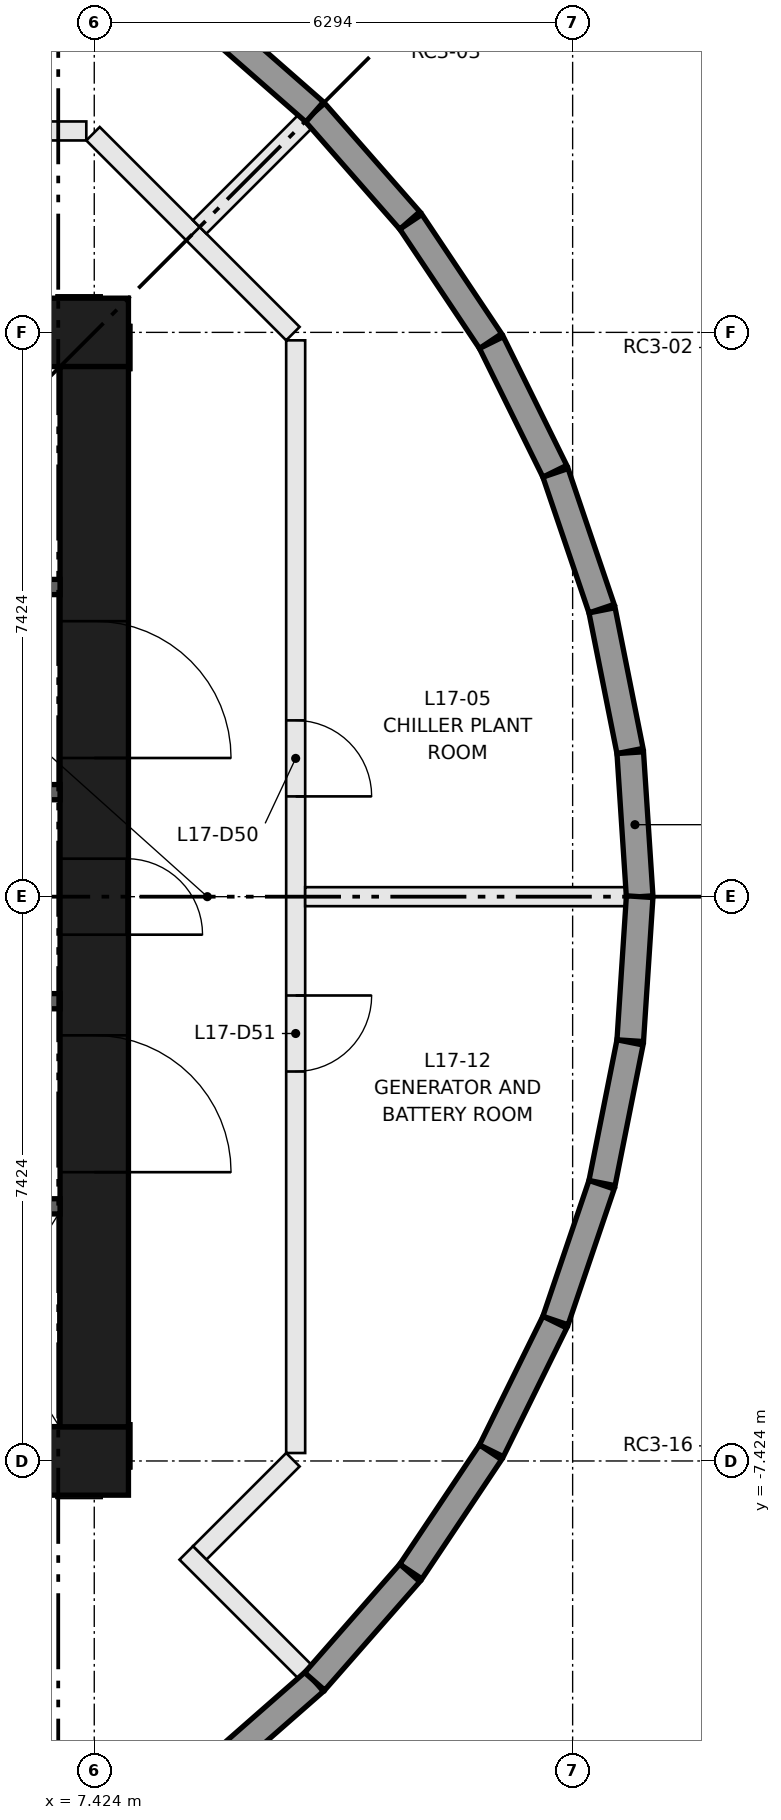
"""IFC4 building model, lengths in metres.
Left out: names, types, materials, properties, quantities, classifications, styles, units other than length and angle.
Written with IfcOpenShell. Run it as: python <this file> out.ifc"""

import sys

from ifc_helpers import new_model, si_unit, direction, frame, frame_2d, origin, place, context, subcontext, project, spatial, rectangle, extrude, element, fill, save


model = new_model("IFC4")
c1 = context("Model", 3, precision=1e-05, world=origin(), true_north=direction((0.0, 1.0)))
c2 = subcontext(c1, "Body", "Model", "MODEL_VIEW")
j1 = project(units=[si_unit("LENGTHUNIT", "METRE"), si_unit("PLANEANGLEUNIT", "RADIAN")], contexts=[c1])
p1 = place(None, origin())
s1 = spatial("IfcSite", under=j1, at=p1, CompositionType="ELEMENT")
p2 = place(p1, origin())
s2 = spatial("IfcBuilding", under=s1, at=p2, CompositionType="ELEMENT")
p3 = place(p2, frame((0.0, 0.0, 66.35)))
s3 = spatial("IfcBuildingStorey", under=s2, at=p3, CompositionType="ELEMENT", Elevation=66.35)
for number, where, z_axis, x_axis in (
    (1, (-7.874, -7.424, 0.0), (0.0, 0.0, 1.0), (1.0, 0.0, 0.0)),
    (2, (-7.874, 7.424, 0.0), (0.0, 0.0, 1.0), (1.0, 0.0, 0.0)),
):
    element("IfcWall", number, at=place(p3, frame(where, z_axis=z_axis, x_axis=x_axis)), inside=s3, PredefinedType="SHEAR", context=c2, shape_type="SweptSolid", body=[
        extrude(rectangle(XDim=15.748, YDim=0.9, at=frame_2d((7.874, 0.0))), origin(), (0.0, 0.0, 1.0), 6.4),
    ])
p4 = place(p3, frame((7.424, -6.974, 0.0), z_axis=(0.0, 0.0, 1.0), x_axis=(0.0, 1.0, 0.0)))
e3 = element("IfcWall", 3, at=p4, inside=s3, PredefinedType="SHEAR", context=c2, shape_type="SweptSolid", body=[
    extrude(rectangle(XDim=13.948, YDim=0.9, at=frame_2d((6.974, 0.0))), origin(), (0.0, 0.0, 1.0), 6.4),
])
p5 = place(p4, frame((6.474, 0.0, 0.0)))
e4 = element("IfcOpeningElement", 4, at=p5, cuts=e3, PredefinedType="OPENING", context=c2, shape_type="SweptSolid", body=[
    extrude(rectangle(XDim=1.0, YDim=2.1, at=frame_2d((0.5, 1.05))), frame((0.0, 0.46, 0.0), z_axis=(0.0, -1.0, 0.0), x_axis=(1.0, 0.0, 0.0)), (0.0, 0.0, 1.0), 0.92),
])
p6 = place(p4, frame((3.35, 0.0, 0.0)))
e5 = element("IfcOpeningElement", 5, at=p6, cuts=e3, PredefinedType="OPENING", context=c2, shape_type="SweptSolid", body=[
    extrude(rectangle(XDim=1.8, YDim=2.1, at=frame_2d((0.9, 1.05))), frame((0.0, 0.46, 0.0), z_axis=(0.0, -1.0, 0.0), x_axis=(1.0, 0.0, 0.0)), (0.0, 0.0, 1.0), 0.92),
])
p7 = place(p4, frame((8.799, 0.0, 0.0)))
e6 = element("IfcOpeningElement", 6, at=p7, cuts=e3, PredefinedType="OPENING", context=c2, shape_type="SweptSolid", body=[
    extrude(rectangle(XDim=1.8, YDim=2.1, at=frame_2d((0.9, 1.05))), frame((0.0, 0.46, 0.0), z_axis=(0.0, -1.0, 0.0), x_axis=(1.0, 0.0, 0.0)), (0.0, 0.0, 1.0), 0.92),
])
p8 = place(p3, frame((-6.974, -4.074, 0.0), z_axis=(0.0, 0.0, 1.0), x_axis=(1.0, 0.0, 0.0)))
e7 = element("IfcWall", 7, at=p8, inside=s3, PredefinedType="SHEAR", context=c2, shape_type="SweptSolid", body=[
    extrude(rectangle(XDim=13.948, YDim=0.2, at=frame_2d((6.974, 0.0))), origin(), (0.0, 0.0, 1.0), 6.05),
])
p9 = place(p8, frame((0.918, 0.0, 0.0)))
e8 = element("IfcOpeningElement", 8, at=p9, cuts=e7, PredefinedType="OPENING", context=c2, shape_type="SweptSolid", body=[
    extrude(rectangle(XDim=1.1, YDim=2.1, at=frame_2d((0.55, 1.05))), frame((0.0, 0.11, 0.0), z_axis=(0.0, -1.0, 0.0), x_axis=(1.0, 0.0, 0.0)), (0.0, 0.0, 1.0), 0.22),
])
p10 = place(p8, frame((4.055, 0.0, 0.0)))
e9 = element("IfcOpeningElement", 9, at=p10, cuts=e7, PredefinedType="OPENING", context=c2, shape_type="SweptSolid", body=[
    extrude(rectangle(XDim=1.1, YDim=2.1, at=frame_2d((0.55, 1.05))), frame((0.0, 0.11, 0.0), z_axis=(0.0, -1.0, 0.0), x_axis=(1.0, 0.0, 0.0)), (0.0, 0.0, 1.0), 0.22),
])
p11 = place(p8, frame((6.658, 0.0, 0.0)))
e10 = element("IfcOpeningElement", 10, at=p11, cuts=e7, PredefinedType="OPENING", context=c2, shape_type="SweptSolid", body=[
    extrude(rectangle(XDim=1.0, YDim=2.1, at=frame_2d((0.5, 1.05))), frame((0.0, 0.11, 0.0), z_axis=(0.0, -1.0, 0.0), x_axis=(1.0, 0.0, 0.0)), (0.0, 0.0, 1.0), 0.22),
])
p12 = place(p8, frame((8.627, 0.0, 0.0)))
e11 = element("IfcOpeningElement", 11, at=p12, cuts=e7, PredefinedType="OPENING", context=c2, shape_type="SweptSolid", body=[
    extrude(rectangle(XDim=1.0, YDim=2.1, at=frame_2d((0.5, 1.05))), frame((0.0, 0.11, 0.0), z_axis=(0.0, -1.0, 0.0), x_axis=(1.0, 0.0, 0.0)), (0.0, 0.0, 1.0), 0.22),
])
p13 = place(p8, frame((10.595, 0.0, 0.0)))
e12 = element("IfcOpeningElement", 12, at=p13, cuts=e7, PredefinedType="OPENING", context=c2, shape_type="SweptSolid", body=[
    extrude(rectangle(XDim=1.0, YDim=2.1, at=frame_2d((0.5, 1.05))), frame((0.0, 0.11, 0.0), z_axis=(0.0, -1.0, 0.0), x_axis=(1.0, 0.0, 0.0)), (0.0, 0.0, 1.0), 0.22),
])
p14 = place(p8, frame((12.564, 0.0, 0.0)))
e13 = element("IfcOpeningElement", 13, at=p14, cuts=e7, PredefinedType="OPENING", context=c2, shape_type="SweptSolid", body=[
    extrude(rectangle(XDim=1.0, YDim=2.1, at=frame_2d((0.5, 1.05))), frame((0.0, 0.11, 0.0), z_axis=(0.0, -1.0, 0.0), x_axis=(1.0, 0.0, 0.0)), (0.0, 0.0, 1.0), 0.22),
])
p15 = place(p3, frame((0.0, 4.074, 0.0), z_axis=(0.0, 0.0, 1.0), x_axis=(1.0, 0.0, 0.0)))
e14 = element("IfcWall", 14, at=p15, inside=s3, PredefinedType="SHEAR", context=c2, shape_type="SweptSolid", body=[
    extrude(rectangle(XDim=6.974, YDim=0.2, at=frame_2d((3.487, 0.0))), origin(), (0.0, 0.0, 1.0), 6.05),
])
p16 = place(p15, frame((1.187, 0.0, 0.0)))
e15 = element("IfcOpeningElement", 15, at=p16, cuts=e14, PredefinedType="OPENING", context=c2, shape_type="SweptSolid", body=[
    extrude(rectangle(XDim=1.0, YDim=2.1, at=frame_2d((0.5, 1.05))), frame((0.0, 0.11, 0.0), z_axis=(0.0, -1.0, 0.0), x_axis=(1.0, 0.0, 0.0)), (0.0, 0.0, 1.0), 0.22),
])
p17 = place(p15, frame((3.94, 0.0, 0.0)))
e16 = element("IfcOpeningElement", 16, at=p17, cuts=e14, PredefinedType="OPENING", context=c2, shape_type="SweptSolid", body=[
    extrude(rectangle(XDim=0.8, YDim=2.1, at=frame_2d((0.4, 1.05))), frame((0.0, 0.11, 0.0), z_axis=(0.0, -1.0, 0.0), x_axis=(1.0, 0.0, 0.0)), (0.0, 0.0, 1.0), 0.22),
])
p18 = place(p15, frame((5.79, 0.0, 0.0)))
e17 = element("IfcOpeningElement", 17, at=p18, cuts=e14, PredefinedType="OPENING", context=c2, shape_type="SweptSolid", body=[
    extrude(rectangle(XDim=0.8, YDim=2.1, at=frame_2d((0.4, 1.05))), frame((0.0, 0.11, 0.0), z_axis=(0.0, -1.0, 0.0), x_axis=(1.0, 0.0, 0.0)), (0.0, 0.0, 1.0), 0.22),
])
for number, where, z_axis, x_axis in (
    (18, (4.374, -1.375, 0.0), (0.0, 0.0, 1.0), (1.0, 0.0, 0.0)),
    (19, (4.374, 1.375, 0.0), (0.0, 0.0, 1.0), (1.0, 0.0, 0.0)),
):
    element("IfcWall", number, at=place(p3, frame(where, z_axis=z_axis, x_axis=x_axis)), inside=s3, PredefinedType="SHEAR", context=c2, shape_type="SweptSolid", body=[
        extrude(rectangle(XDim=2.6, YDim=0.2, at=frame_2d((1.3, 0.0))), origin(), (0.0, 0.0, 1.0), 6.05),
    ])
p19 = place(p3, frame((8.722, 8.722, 0.0), z_axis=(0.0, 0.0, 1.0), x_axis=(0.707172427269, -0.707041129009, 0.0)))
e20 = element("IfcWall", 20, at=p19, inside=s3, PredefinedType="PARTITIONING", context=c2, shape_type="SweptSolid", body=[
    extrude(rectangle(XDim=1.859, YDim=0.25, at=frame_2d((0.93, 0.0))), origin(), (0.0, 0.0, 1.0), 6.05),
])
p20 = place(p3, frame((10.074, 7.319, 0.0), z_axis=(0.0, 0.0, 1.0), x_axis=(0.0, -1.0, 0.0)))
e21 = element("IfcWall", 21, at=p20, inside=s3, PredefinedType="PARTITIONING", context=c2, shape_type="SweptSolid", body=[
    extrude(rectangle(XDim=7.319, YDim=0.25, at=frame_2d((3.66, 0.0))), origin(), (0.0, 0.0, 1.0), 6.05),
])
p21 = place(p20, frame((5.0, 0.0, 0.0)))
e22 = element("IfcOpeningElement", 22, at=p21, cuts=e21, PredefinedType="OPENING", context=c2, shape_type="SweptSolid", body=[
    extrude(rectangle(XDim=1.0, YDim=2.1, at=frame_2d((0.5, 1.05))), frame((0.0, 0.135, 0.0), z_axis=(0.0, -1.0, 0.0), x_axis=(1.0, 0.0, 0.0)), (0.0, 0.0, 1.0), 0.27),
])
p22 = place(p3, frame((10.037, -7.408, 0.0), z_axis=(0.0, 0.0, 1.0), x_axis=(-0.707177157576, -0.707036397792, 0.0)))
e23 = element("IfcWall", 23, at=p22, inside=s3, PredefinedType="PARTITIONING", context=c2, shape_type="SweptSolid", body=[
    extrude(rectangle(XDim=1.734, YDim=0.25, at=frame_2d((0.867, 0.0))), origin(), (0.0, 0.0, 1.0), 6.05),
])
p23 = place(p3, frame((10.074, 0.0, 0.0), z_axis=(0.0, 0.0, 1.0), x_axis=(0.0, -1.0, 0.0)))
e24 = element("IfcWall", 24, at=p23, inside=s3, PredefinedType="PARTITIONING", context=c2, shape_type="SweptSolid", body=[
    extrude(rectangle(XDim=7.319, YDim=0.25, at=frame_2d((3.66, 0.0))), origin(), (0.0, 0.0, 1.0), 6.05),
])
p24 = place(p23, frame((1.3, 0.0, 0.0)))
e25 = element("IfcOpeningElement", 25, at=p24, cuts=e24, PredefinedType="OPENING", context=c2, shape_type="SweptSolid", body=[
    extrude(rectangle(XDim=1.0, YDim=2.1, at=frame_2d((0.5, 1.05))), frame((0.0, 0.135, 0.0), z_axis=(0.0, -1.0, 0.0), x_axis=(1.0, 0.0, 0.0)), (0.0, 0.0, 1.0), 0.27),
])
p25 = place(p3, frame((0.125, 10.074, 0.0), z_axis=(0.0, 0.0, 1.0), x_axis=(1.0, 0.0, 0.0)))
e26 = element("IfcWall", 26, at=p25, inside=s3, PredefinedType="PARTITIONING", context=c2, shape_type="SweptSolid", body=[
    extrude(rectangle(XDim=7.194, YDim=0.25, at=frame_2d((3.597, 0.0))), origin(), (0.0, 0.0, 1.0), 6.05),
])
p26 = place(p25, frame((1.2, 0.0, 0.0)))
e27 = element("IfcOpeningElement", 27, at=p26, cuts=e26, PredefinedType="OPENING", context=c2, shape_type="SweptSolid", body=[
    extrude(rectangle(XDim=1.0, YDim=2.1, at=frame_2d((0.5, 1.05))), frame((0.0, 0.135, 0.0), z_axis=(0.0, -1.0, 0.0), x_axis=(1.0, 0.0, 0.0)), (0.0, 0.0, 1.0), 0.27),
])
p27 = place(p3, frame((7.408, 10.037, 0.0), z_axis=(0.0, 0.0, 1.0), x_axis=(0.707041129009, -0.707172427269, 0.0)))
e28 = element("IfcWall", 28, at=p27, inside=s3, PredefinedType="PARTITIONING", context=c2, shape_type="SweptSolid", body=[
    extrude(rectangle(XDim=1.859, YDim=0.25, at=frame_2d((0.93, 0.0))), origin(), (0.0, 0.0, 1.0), 6.05),
])
p28 = place(p3, frame((10.324, 10.324, 0.0), z_axis=(0.0, 0.0, 1.0), x_axis=(0.659360034108, -0.751827337506, 0.0)))
e29 = element("IfcWall", 29, at=p28, inside=s3, PredefinedType="PARTITIONING", context=c2, shape_type="SweptSolid", body=[
    extrude(rectangle(XDim=1.898, YDim=0.35, at=frame_2d((0.949, 0.0))), origin(), (0.0, 0.0, 1.0), 6.05),
])
p29 = place(p3, frame((11.589, 8.878, 0.0), z_axis=(0.0, 0.0, 1.0), x_axis=(0.555595643605, -0.831452632931, 0.0)))
e30 = element("IfcWall", 30, at=p29, inside=s3, PredefinedType="PARTITIONING", context=c2, shape_type="SweptSolid", body=[
    extrude(rectangle(XDim=1.887, YDim=0.35, at=frame_2d((0.943, 0.0))), origin(), (0.0, 0.0, 1.0), 6.05),
])
for number, where, z_axis, x_axis in (
    (31, (12.649, 7.29, 0.0), (0.0, 0.0, 1.0), (0.442, -0.897, 0.0)),
    (32, (13.492, 5.576, 0.0), (0.0, 0.0, 1.0), (0.322, -0.947, 0.0)),
):
    element("IfcWall", number, at=place(p3, frame(where, z_axis=z_axis, x_axis=x_axis)), inside=s3, PredefinedType="PARTITIONING", context=c2, shape_type="SweptSolid", body=[
        extrude(rectangle(XDim=1.887, YDim=0.35, at=frame_2d((0.943, 0.0))), origin(), (0.0, 0.0, 1.0), 6.05),
    ])
p30 = place(p3, frame((14.105, 3.768, 0.0), z_axis=(0.0, 0.0, 1.0), x_axis=(0.195120723342, -0.980779232714, 0.0)))
e33 = element("IfcWall", 33, at=p30, inside=s3, PredefinedType="PARTITIONING", context=c2, shape_type="SweptSolid", body=[
    extrude(rectangle(XDim=1.887, YDim=0.35, at=frame_2d((0.943, 0.0))), origin(), (0.0, 0.0, 1.0), 6.05),
])
p31 = place(p3, frame((14.476, 1.894, 0.0), z_axis=(0.0, 0.0, 1.0), x_axis=(0.065460533058, -0.997855159135, 0.0)))
e34 = element("IfcWall", 34, at=p31, inside=s3, PredefinedType="PARTITIONING", context=c2, shape_type="SweptSolid", body=[
    extrude(rectangle(XDim=1.898, YDim=0.35, at=frame_2d((0.949, 0.0))), origin(), (0.0, 0.0, 1.0), 6.05),
])
p32 = place(p3, frame((8.811, 8.811, 0.0), z_axis=(0.0, 0.0, 1.0), x_axis=(0.707106781187, 0.707106781187, 0.0)))
e35 = element("IfcWall", 35, at=p32, inside=s3, PredefinedType="PARTITIONING", context=c2, shape_type="SweptSolid", body=[
    extrude(rectangle(XDim=1.956, YDim=0.25, at=frame_2d((0.978, 0.0))), origin(), (0.0, 0.0, 1.0), 6.05),
])
p33 = place(p3, frame((14.417, 0.0, 0.0), z_axis=(0.0, 0.0, 1.0), x_axis=(-1.0, 0.0, 0.0)))
e36 = element("IfcWall", 36, at=p33, inside=s3, PredefinedType="PARTITIONING", context=c2, shape_type="SweptSolid", body=[
    extrude(rectangle(XDim=4.218, YDim=0.25, at=frame_2d((2.109, 0.0))), origin(), (0.0, 0.0, 1.0), 6.05),
])
for number, where, z_axis, x_axis in (
    (37, (8.896, 11.575, 0.0), (0.0, 0.0, 1.0), (0.752, -0.659, 0.0)),
    (38, (10.324, -10.324, 0.0), (0.0, 0.0, 1.0), (-0.752, -0.659, 0.0)),
):
    element("IfcWall", number, at=place(p3, frame(where, z_axis=z_axis, x_axis=x_axis)), inside=s3, PredefinedType="PARTITIONING", context=c2, shape_type="SweptSolid", body=[
        extrude(rectangle(XDim=1.898, YDim=0.35, at=frame_2d((0.949, 0.0))), origin(), (0.0, 0.0, 1.0), 6.05),
    ])
p34 = place(p3, frame((8.634, -8.634, 0.0), z_axis=(0.0, 0.0, 1.0), x_axis=(0.707106781187, -0.707106781187, 0.0)))
e39 = element("IfcWall", 39, at=p34, inside=s3, PredefinedType="PARTITIONING", context=c2, shape_type="SweptSolid", body=[
    extrude(rectangle(XDim=2.206, YDim=0.25, at=frame_2d((1.103, 0.0))), origin(), (0.0, 0.0, 1.0), 6.05),
])
p35 = place(p3, frame((11.575, -8.896, 0.0), z_axis=(0.0, 0.0, 1.0), x_axis=(-0.659360034108, -0.751827337506, 0.0)))
e40 = element("IfcWall", 40, at=p35, inside=s3, PredefinedType="PARTITIONING", context=c2, shape_type="SweptSolid", body=[
    extrude(rectangle(XDim=1.898, YDim=0.35, at=frame_2d((0.949, 0.0))), origin(), (0.0, 0.0, 1.0), 6.05),
])
p36 = place(p3, frame((12.638, -7.31, 0.0), z_axis=(0.0, 0.0, 1.0), x_axis=(-0.555595643605, -0.831452632931, 0.0)))
e41 = element("IfcWall", 41, at=p36, inside=s3, PredefinedType="PARTITIONING", context=c2, shape_type="SweptSolid", body=[
    extrude(rectangle(XDim=1.887, YDim=0.35, at=frame_2d((0.943, 0.0))), origin(), (0.0, 0.0, 1.0), 6.05),
])
for number, where, z_axis, x_axis in (
    (42, (13.483, -5.597, 0.0), (0.0, 0.0, 1.0), (-0.442, -0.897, 0.0)),
    (43, (14.099, -3.79, 0.0), (0.0, 0.0, 1.0), (-0.322, -0.947, 0.0)),
):
    element("IfcWall", number, at=place(p3, frame(where, z_axis=z_axis, x_axis=x_axis)), inside=s3, PredefinedType="PARTITIONING", context=c2, shape_type="SweptSolid", body=[
        extrude(rectangle(XDim=1.887, YDim=0.35, at=frame_2d((0.943, 0.0))), origin(), (0.0, 0.0, 1.0), 6.05),
    ])
p37 = place(p3, frame((14.473, -1.917, 0.0), z_axis=(0.0, 0.0, 1.0), x_axis=(-0.195120723342, -0.980779232714, 0.0)))
e44 = element("IfcWall", 44, at=p37, inside=s3, PredefinedType="PARTITIONING", context=c2, shape_type="SweptSolid", body=[
    extrude(rectangle(XDim=1.887, YDim=0.35, at=frame_2d((0.943, 0.0))), origin(), (0.0, 0.0, 1.0), 6.05),
])
p38 = place(p3, frame((14.6, 0.0, 0.0), z_axis=(0.0, 0.0, 1.0), x_axis=(-0.065460533058, -0.997855159135, 0.0)))
e45 = element("IfcWall", 45, at=p38, inside=s3, PredefinedType="PARTITIONING", context=c2, shape_type="SweptSolid", body=[
    extrude(rectangle(XDim=1.898, YDim=0.35, at=frame_2d((0.949, 0.0))), origin(), (0.0, 0.0, 1.0), 6.05),
])
p39 = place(p5, frame((1.0, 0.0, 0.0), z_axis=(0.0, 0.0, 1.0), x_axis=(-1.0, 0.0, 0.0)))
e46 = element("IfcDoor", 46, at=p39, inside=s3, OperationType="SINGLE_SWING_LEFT", PredefinedType="DOOR", context=c2, shape_type="SweptSolid", body=[
    extrude(rectangle(XDim=1.0, YDim=2.1, at=frame_2d((0.5, 1.05))), frame((0.0, 0.45, 0.0), z_axis=(0.0, -1.0, 0.0), x_axis=(1.0, 0.0, 0.0)), (0.0, 0.0, 1.0), 0.05),
])
fill(e4, e46)
p40 = place(p6, frame((1.8, 0.0, 0.0), z_axis=(0.0, 0.0, 1.0), x_axis=(-1.0, 0.0, 0.0)))
e47 = element("IfcDoor", 47, at=p40, inside=s3, OperationType="DOUBLE_DOOR_SINGLE_SWING", PredefinedType="DOOR", context=c2, shape_type="SweptSolid", body=[
    extrude(rectangle(XDim=1.8, YDim=2.1, at=frame_2d((0.9, 1.05))), frame((0.0, 0.025, 0.0), z_axis=(0.0, -1.0, 0.0), x_axis=(1.0, 0.0, 0.0)), (0.0, 0.0, 1.0), 0.05),
])
fill(e5, e47)
p41 = place(p7, frame((1.8, 0.0, 0.0), z_axis=(0.0, 0.0, 1.0), x_axis=(-1.0, 0.0, 0.0)))
e48 = element("IfcDoor", 48, at=p41, inside=s3, OperationType="DOUBLE_DOOR_SINGLE_SWING", PredefinedType="DOOR", context=c2, shape_type="SweptSolid", body=[
    extrude(rectangle(XDim=1.8, YDim=2.1, at=frame_2d((0.9, 1.05))), frame((0.0, 0.025, 0.0), z_axis=(0.0, -1.0, 0.0), x_axis=(1.0, 0.0, 0.0)), (0.0, 0.0, 1.0), 0.05),
])
fill(e6, e48)
p42 = place(p21, origin())
e49 = element("IfcDoor", 49, at=p42, inside=s3, OperationType="SINGLE_SWING_RIGHT", PredefinedType="DOOR", context=c2, shape_type="SweptSolid", body=[
    extrude(rectangle(XDim=1.0, YDim=2.1, at=frame_2d((0.5, 1.05))), frame((0.0, 0.025, 0.0), z_axis=(0.0, -1.0, 0.0), x_axis=(1.0, 0.0, 0.0)), (0.0, 0.0, 1.0), 0.05),
])
fill(e22, e49)
p43 = place(p24, origin())
e50 = element("IfcDoor", 50, at=p43, inside=s3, OperationType="SINGLE_SWING_LEFT", PredefinedType="DOOR", context=c2, shape_type="SweptSolid", body=[
    extrude(rectangle(XDim=1.0, YDim=2.1, at=frame_2d((0.5, 1.05))), frame((0.0, 0.025, 0.0), z_axis=(0.0, -1.0, 0.0), x_axis=(1.0, 0.0, 0.0)), (0.0, 0.0, 1.0), 0.05),
])
fill(e25, e50)
save(model, sys.argv[1])
